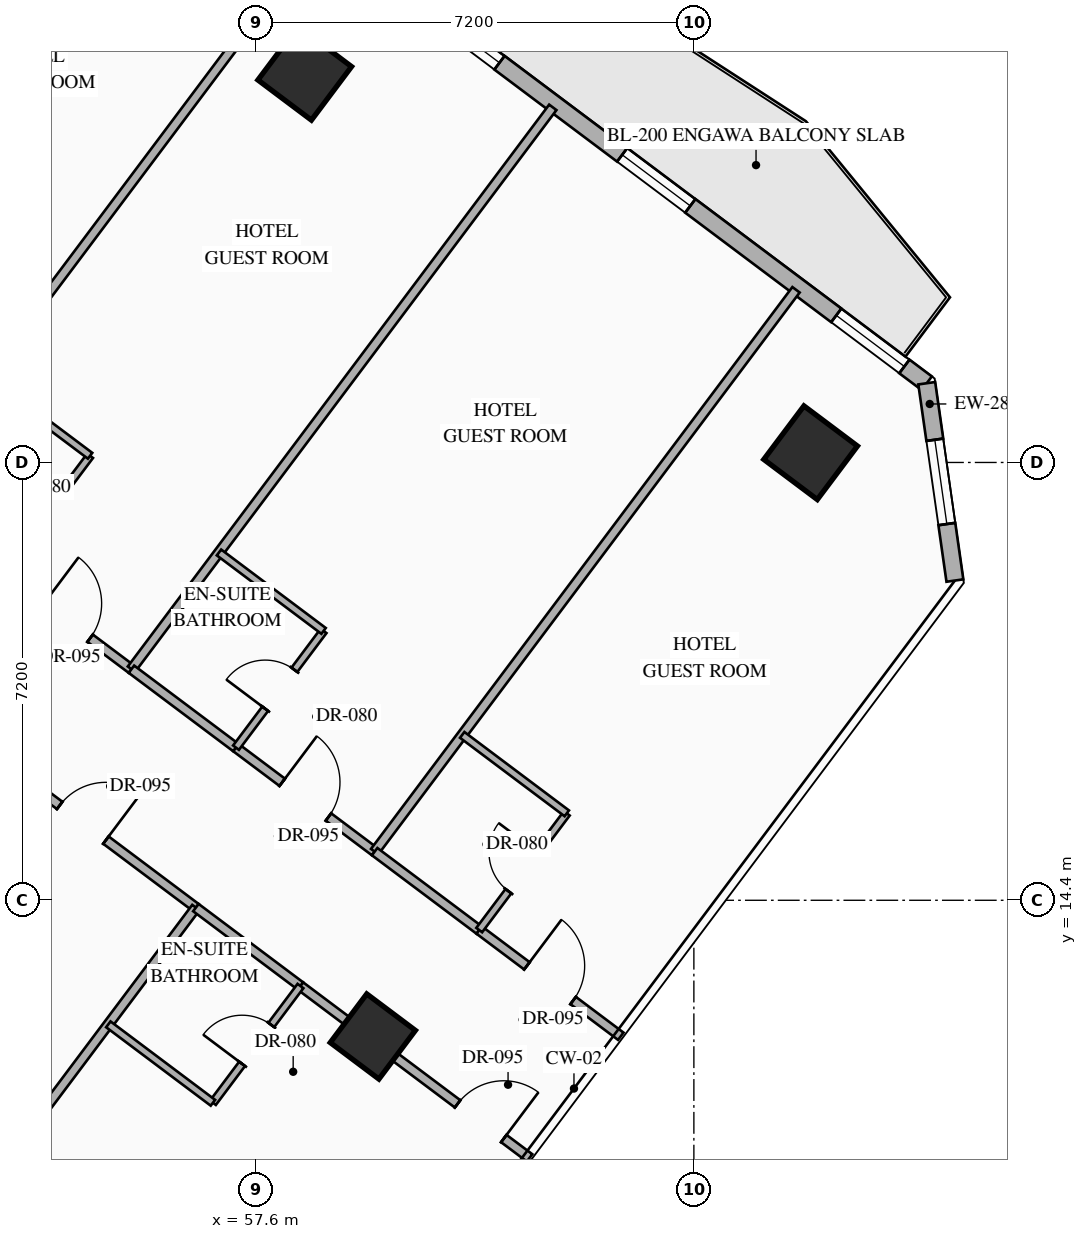
"""IFC4 building model, lengths in metres.
Left out: names, types, materials, properties, quantities, classifications, styles, units other than length and angle.
Written with IfcOpenShell. Run it as: python <this file> out.ifc"""

import sys

from ifc_helpers import new_model, si_unit, direction, frame, frame_2d, origin, origin_2d, place, context, subcontext, project, spatial, rectangle, hollow_rectangle, extrude, element, fill, save


model = new_model("IFC4")
c1 = context("Model", 3, precision=1e-05, world=origin(), true_north=direction((0.0, 1.0)))
c2 = subcontext(c1, "Body", "Model", "MODEL_VIEW")
j1 = project(units=[si_unit("LENGTHUNIT", "METRE"), si_unit("PLANEANGLEUNIT", "RADIAN")], contexts=[c1])
p1 = place(None, origin())
s1 = spatial("IfcSite", under=j1, at=p1, CompositionType="ELEMENT")
p2 = place(p1, origin())
s2 = spatial("IfcBuilding", under=s1, at=p2, CompositionType="ELEMENT")
p3 = place(p2, frame((0.0, 0.0, 36.6)))
s3 = spatial("IfcBuildingStorey", under=s2, at=p3, CompositionType="ELEMENT", Elevation=36.6)
for number, where, z_axis, x_axis in (
    (1, (58.4, 28.0, 0.0), (0.0, 0.0, 1.0), (0.8, -0.6, 0.0)),
    (2, (66.72, 21.76, 0.0), (0.0, 0.0, 1.0), (0.8, -0.6, 0.0)),
):
    element("IfcColumn", number, at=place(p3, frame(where, z_axis=z_axis, x_axis=x_axis)), inside=s3, PredefinedType="COLUMN", context=c2, shape_type="SweptSolid", body=[
        extrude(hollow_rectangle(XDim=1.1, YDim=1.1, WallThickness=0.04, at=origin_2d()), origin(), (0.0, 0.0, 1.0), 3.35),
    ])
p4 = place(p3, frame((59.52, 12.16, 0.0), z_axis=(0.0, 0.0, 1.0), x_axis=(0.799999996291, -0.600000004945, 0.0)))
e3 = element("IfcColumn", 3, at=p4, inside=s3, PredefinedType="COLUMN", context=c2, shape_type="SweptSolid", body=[
    extrude(hollow_rectangle(XDim=1.0, YDim=1.0, WallThickness=0.038, at=origin_2d()), origin(), (0.0, 0.0, 1.0), 3.35),
])
p5 = place(p3, frame((44.86, 40.73, 0.0), z_axis=(0.0, 0.0, 1.0), x_axis=(0.800006902154, -0.599990797017, 0.0)))
e4 = element("IfcWall", 4, at=p5, inside=s3, PredefinedType="STANDARD", context=c2, shape_type="SweptSolid", body=[
    extrude(rectangle(XDim=29.712, YDim=0.28, at=frame_2d((14.856, 0.0))), origin(), (0.0, 0.0, 1.0), 3.13),
])
p6 = place(p5, frame((14.249, 0.0, 0.0)))
e5 = element("IfcOpeningElement", 5, at=p6, cuts=e4, PredefinedType="OPENING", context=c2, shape_type="SweptSolid", body=[
    extrude(rectangle(XDim=1.1, YDim=2.2, at=frame_2d((0.55, 1.1))), frame((0.0, 0.15, 0.0), z_axis=(0.0, -1.0, 0.0), x_axis=(1.0, 0.0, 0.0)), (0.0, 0.0, 1.0), 0.3),
])
p7 = place(p5, frame((1.612, 0.0, 0.85)))
e6 = element("IfcOpeningElement", 6, at=p7, cuts=e4, PredefinedType="OPENING", context=c2, shape_type="SweptSolid", body=[
    extrude(rectangle(XDim=1.4, YDim=1.8, at=frame_2d((0.7, 0.9))), frame((0.0, 0.15, 0.0), z_axis=(0.0, -1.0, 0.0), x_axis=(1.0, 0.0, 0.0)), (0.0, 0.0, 1.0), 0.3),
])
p8 = place(p5, frame((5.667, 0.0, 0.85)))
e7 = element("IfcOpeningElement", 7, at=p8, cuts=e4, PredefinedType="OPENING", context=c2, shape_type="SweptSolid", body=[
    extrude(rectangle(XDim=1.4, YDim=1.8, at=frame_2d((0.7, 0.9))), frame((0.0, 0.15, 0.0), z_axis=(0.0, -1.0, 0.0), x_axis=(1.0, 0.0, 0.0)), (0.0, 0.0, 1.0), 0.3),
])
p9 = place(p5, frame((9.912, 0.0, 0.85)))
e8 = element("IfcOpeningElement", 8, at=p9, cuts=e4, PredefinedType="OPENING", context=c2, shape_type="SweptSolid", body=[
    extrude(rectangle(XDim=1.4, YDim=1.8, at=frame_2d((0.7, 0.9))), frame((0.0, 0.15, 0.0), z_axis=(0.0, -1.0, 0.0), x_axis=(1.0, 0.0, 0.0)), (0.0, 0.0, 1.0), 0.3),
])
p10 = place(p5, frame((19.528, 0.0, 0.85)))
e9 = element("IfcOpeningElement", 9, at=p10, cuts=e4, PredefinedType="OPENING", context=c2, shape_type="SweptSolid", body=[
    extrude(rectangle(XDim=1.4, YDim=1.8, at=frame_2d((0.7, 0.9))), frame((0.0, 0.15, 0.0), z_axis=(0.0, -1.0, 0.0), x_axis=(1.0, 0.0, 0.0)), (0.0, 0.0, 1.0), 0.3),
])
p11 = place(p5, frame((23.451, 0.0, 0.85)))
e10 = element("IfcOpeningElement", 10, at=p11, cuts=e4, PredefinedType="OPENING", context=c2, shape_type="SweptSolid", body=[
    extrude(rectangle(XDim=1.4, YDim=1.8, at=frame_2d((0.7, 0.9))), frame((0.0, 0.15, 0.0), z_axis=(0.0, -1.0, 0.0), x_axis=(1.0, 0.0, 0.0)), (0.0, 0.0, 1.0), 0.3),
])
p12 = place(p5, frame((27.852, 0.0, 0.85)))
e11 = element("IfcOpeningElement", 11, at=p12, cuts=e4, PredefinedType="OPENING", context=c2, shape_type="SweptSolid", body=[
    extrude(rectangle(XDim=1.4, YDim=1.8, at=frame_2d((0.7, 0.9))), frame((0.0, 0.15, 0.0), z_axis=(0.0, -1.0, 0.0), x_axis=(1.0, 0.0, 0.0)), (0.0, 0.0, 1.0), 0.3),
])
p13 = place(p3, frame((68.63, 22.903, 0.0), z_axis=(0.0, 0.0, 1.0), x_axis=(0.141285803956, -0.989968848803, 0.0)))
e12 = element("IfcWall", 12, at=p13, inside=s3, PredefinedType="STANDARD", context=c2, shape_type="SweptSolid", body=[
    extrude(rectangle(XDim=3.278, YDim=0.28, at=frame_2d((1.639, 0.0))), origin(), (0.0, 0.0, 1.0), 3.13),
])
p14 = place(p13, frame((0.939, 0.0, 0.85)))
e13 = element("IfcOpeningElement", 13, at=p14, cuts=e12, PredefinedType="OPENING", context=c2, shape_type="SweptSolid", body=[
    extrude(rectangle(XDim=1.4, YDim=1.8, at=frame_2d((0.7, 0.9))), frame((0.0, 0.15, 0.0), z_axis=(0.0, -1.0, 0.0), x_axis=(1.0, 0.0, 0.0)), (0.0, 0.0, 1.0), 0.3),
])
for number, where, z_axis, x_axis in (
    (14, (47.87, 23.96, 0.0), (0.0, 0.0, 1.0), (0.6, 0.8, 0.0)),
    (15, (51.71, 21.08, 0.0), (0.0, 0.0, 1.0), (0.6, 0.8, 0.0)),
):
    element("IfcWall", number, at=place(p3, frame(where, z_axis=z_axis, x_axis=x_axis)), inside=s3, PredefinedType="PARTITIONING", context=c2, shape_type="SweptSolid", body=[
        extrude(rectangle(XDim=11.55, YDim=0.15, at=frame_2d((5.775, 0.0))), origin(), (0.0, 0.0, 1.0), 3.13),
    ])
p15 = place(p3, frame((53.43, 19.79, 0.0), z_axis=(0.0, 0.0, 1.0), x_axis=(0.8, -0.6, 0.0)))
e16 = element("IfcWall", 16, at=p15, inside=s3, PredefinedType="PARTITIONING", context=c2, shape_type="SweptSolid", body=[
    extrude(rectangle(XDim=2.65, YDim=0.15, at=frame_2d((1.325, 0.0))), origin(), (0.0, 0.0, 1.0), 2.775),
])
p16 = place(p15, frame((0.85, 0.0, 0.0)))
e17 = element("IfcOpeningElement", 17, at=p16, cuts=e16, PredefinedType="OPENING", context=c2, shape_type="SweptSolid", body=[
    extrude(rectangle(XDim=0.95, YDim=2.15, at=frame_2d((0.475, 1.075))), frame((0.0, 0.085, 0.0), z_axis=(0.0, -1.0, 0.0), x_axis=(1.0, 0.0, 0.0)), (0.0, 0.0, 1.0), 0.17),
])
p17 = place(p3, frame((53.43, 19.79, 0.0), z_axis=(0.0, 0.0, 1.0), x_axis=(0.600065100855, 0.79995117022, 0.0)))
e18 = element("IfcWall", 18, at=p17, inside=s3, PredefinedType="PARTITIONING", context=c2, shape_type="SweptSolid", body=[
    extrude(rectangle(XDim=2.4, YDim=0.12, at=frame_2d((1.2, 0.0))), origin(), (0.0, 0.0, 1.0), 3.13),
])
p18 = place(p17, frame((0.8, 0.0, 0.0)))
e19 = element("IfcOpeningElement", 19, at=p18, cuts=e18, PredefinedType="OPENING", context=c2, shape_type="SweptSolid", body=[
    extrude(rectangle(XDim=0.8, YDim=2.06, at=frame_2d((0.4, 1.03))), frame((0.0, 0.07, 0.0), z_axis=(0.0, -1.0, 0.0), x_axis=(1.0, 0.0, 0.0)), (0.0, 0.0, 1.0), 0.14),
])
p19 = place(p3, frame((53.15, 23.0, 0.0), z_axis=(0.0, 0.0, 1.0), x_axis=(0.800027249606, -0.599963665473, 0.0)))
e20 = element("IfcWall", 20, at=p19, inside=s3, PredefinedType="PARTITIONING", context=c2, shape_type="SweptSolid", body=[
    extrude(rectangle(XDim=2.15, YDim=0.12, at=frame_2d((1.075, 0.0))), origin(), (0.0, 0.0, 1.0), 3.13),
])
p20 = place(p3, frame((55.55, 18.2, 0.0), z_axis=(0.0, 0.0, 1.0), x_axis=(0.599996617946, 0.80000253653, 0.0)))
e21 = element("IfcWall", 21, at=p20, inside=s3, PredefinedType="PARTITIONING", context=c2, shape_type="SweptSolid", body=[
    extrude(rectangle(XDim=11.55, YDim=0.15, at=frame_2d((5.775, 0.0))), origin(), (0.0, 0.0, 1.0), 3.13),
])
p21 = place(p3, frame((55.55, 18.2, 0.0), z_axis=(0.0, 0.0, 1.0), x_axis=(0.79998637334, -0.60001816845, 0.0)))
e22 = element("IfcWall", 22, at=p21, inside=s3, PredefinedType="PARTITIONING", context=c2, shape_type="SweptSolid", body=[
    extrude(rectangle(XDim=2.15, YDim=0.15, at=frame_2d((1.075, 0.0))), origin(), (0.0, 0.0, 1.0), 2.775),
])
p22 = place(p3, frame((57.27, 16.91, 0.0), z_axis=(0.0, 0.0, 1.0), x_axis=(0.800010279488, -0.599986293772, 0.0)))
e23 = element("IfcWall", 23, at=p22, inside=s3, PredefinedType="PARTITIONING", context=c2, shape_type="SweptSolid", body=[
    extrude(rectangle(XDim=2.85, YDim=0.15, at=frame_2d((1.425, 0.0))), origin(), (0.0, 0.0, 1.0), 2.775),
])
p23 = place(p22, frame((0.95, 0.0, 0.0)))
e24 = element("IfcOpeningElement", 24, at=p23, cuts=e23, PredefinedType="OPENING", context=c2, shape_type="SweptSolid", body=[
    extrude(rectangle(XDim=0.95, YDim=2.15, at=frame_2d((0.475, 1.075))), frame((0.0, 0.085, 0.0), z_axis=(0.0, -1.0, 0.0), x_axis=(1.0, 0.0, 0.0)), (0.0, 0.0, 1.0), 0.17),
])
p24 = place(p3, frame((57.27, 16.91, 0.0), z_axis=(0.0, 0.0, 1.0), x_axis=(0.599951172744, 0.800036618114, 0.0)))
e25 = element("IfcWall", 25, at=p24, inside=s3, PredefinedType="PARTITIONING", context=c2, shape_type="SweptSolid", body=[
    extrude(rectangle(XDim=2.4, YDim=0.12, at=frame_2d((1.2, 0.0))), origin(), (0.0, 0.0, 1.0), 3.13),
])
p25 = place(p24, frame((0.8, 0.0, 0.0)))
e26 = element("IfcOpeningElement", 26, at=p25, cuts=e25, PredefinedType="OPENING", context=c2, shape_type="SweptSolid", body=[
    extrude(rectangle(XDim=0.8, YDim=2.06, at=frame_2d((0.4, 1.03))), frame((0.0, 0.07, 0.0), z_axis=(0.0, -1.0, 0.0), x_axis=(1.0, 0.0, 0.0)), (0.0, 0.0, 1.0), 0.14),
])
p26 = place(p3, frame((56.99, 20.12, 0.0), z_axis=(0.0, 0.0, 1.0), x_axis=(0.79998637334, -0.60001816845, 0.0)))
e27 = element("IfcWall", 27, at=p26, inside=s3, PredefinedType="PARTITIONING", context=c2, shape_type="SweptSolid", body=[
    extrude(rectangle(XDim=2.15, YDim=0.12, at=frame_2d((1.075, 0.0))), origin(), (0.0, 0.0, 1.0), 3.13),
])
p27 = place(p3, frame((59.55, 15.2, 0.0), z_axis=(0.0, 0.0, 1.0), x_axis=(0.599996617946, 0.80000253653, 0.0)))
e28 = element("IfcWall", 28, at=p27, inside=s3, PredefinedType="PARTITIONING", context=c2, shape_type="SweptSolid", body=[
    extrude(rectangle(XDim=11.55, YDim=0.15, at=frame_2d((5.775, 0.0))), origin(), (0.0, 0.0, 1.0), 3.13),
])
p28 = place(p3, frame((59.55, 15.2, 0.0), z_axis=(0.0, 0.0, 1.0), x_axis=(0.79998637334, -0.60001816845, 0.0)))
e29 = element("IfcWall", 29, at=p28, inside=s3, PredefinedType="PARTITIONING", context=c2, shape_type="SweptSolid", body=[
    extrude(rectangle(XDim=2.15, YDim=0.15, at=frame_2d((1.075, 0.0))), origin(), (0.0, 0.0, 1.0), 2.775),
])
p29 = place(p3, frame((61.27, 13.91, 0.0), z_axis=(0.0, 0.0, 1.0), x_axis=(0.800010068184, -0.59998657552, 0.0)))
e30 = element("IfcWall", 30, at=p29, inside=s3, PredefinedType="PARTITIONING", context=c2, shape_type="SweptSolid", body=[
    extrude(rectangle(XDim=2.91, YDim=0.15, at=frame_2d((1.455, 0.0))), origin(), (0.0, 0.0, 1.0), 3.13),
])
p30 = place(p29, frame((0.98, 0.0, 0.0)))
e31 = element("IfcOpeningElement", 31, at=p30, cuts=e30, PredefinedType="OPENING", context=c2, shape_type="SweptSolid", body=[
    extrude(rectangle(XDim=0.95, YDim=2.15, at=frame_2d((0.475, 1.075))), frame((0.0, 0.085, 0.0), z_axis=(0.0, -1.0, 0.0), x_axis=(1.0, 0.0, 0.0)), (0.0, 0.0, 1.0), 0.17),
])
p31 = place(p3, frame((61.27, 13.91, 0.0), z_axis=(0.0, 0.0, 1.0), x_axis=(0.599951172744, 0.800036618114, 0.0)))
e32 = element("IfcWall", 32, at=p31, inside=s3, PredefinedType="PARTITIONING", context=c2, shape_type="SweptSolid", body=[
    extrude(rectangle(XDim=2.4, YDim=0.12, at=frame_2d((1.2, 0.0))), origin(), (0.0, 0.0, 1.0), 3.13),
])
p32 = place(p31, frame((0.8, 0.0, 0.0)))
e33 = element("IfcOpeningElement", 33, at=p32, cuts=e32, PredefinedType="OPENING", context=c2, shape_type="SweptSolid", body=[
    extrude(rectangle(XDim=0.8, YDim=2.06, at=frame_2d((0.4, 1.03))), frame((0.0, 0.07, 0.0), z_axis=(0.0, -1.0, 0.0), x_axis=(1.0, 0.0, 0.0)), (0.0, 0.0, 1.0), 0.14),
])
p33 = place(p3, frame((60.99, 17.12, 0.0), z_axis=(0.0, 0.0, 1.0), x_axis=(0.79998637334, -0.60001816845, 0.0)))
e34 = element("IfcWall", 34, at=p33, inside=s3, PredefinedType="PARTITIONING", context=c2, shape_type="SweptSolid", body=[
    extrude(rectangle(XDim=2.15, YDim=0.12, at=frame_2d((1.075, 0.0))), origin(), (0.0, 0.0, 1.0), 3.13),
])
p34 = place(p3, frame((52.89, 17.07, 0.0), z_axis=(0.0, 0.0, 1.0), x_axis=(0.800012600101, -0.599983199498, 0.0)))
e35 = element("IfcWall", 35, at=p34, inside=s3, PredefinedType="PARTITIONING", context=c2, shape_type="SweptSolid", body=[
    extrude(rectangle(XDim=4.65, YDim=0.15, at=frame_2d((2.325, 0.0))), origin(), (0.0, 0.0, 1.0), 2.425),
])
p35 = place(p34, frame((1.85, 0.0, 0.0)))
e36 = element("IfcOpeningElement", 36, at=p35, cuts=e35, PredefinedType="OPENING", context=c2, shape_type="SweptSolid", body=[
    extrude(rectangle(XDim=0.95, YDim=2.15, at=frame_2d((0.475, 1.075))), frame((0.0, 0.085, 0.0), z_axis=(0.0, -1.0, 0.0), x_axis=(1.0, 0.0, 0.0)), (0.0, 0.0, 1.0), 0.17),
])
p36 = place(p3, frame((49.8, 5.2, 0.0), z_axis=(0.0, 0.0, 1.0), x_axis=(0.6, 0.8, 0.0)))
e37 = element("IfcWall", 37, at=p36, inside=s3, PredefinedType="PARTITIONING", context=c2, shape_type="SweptSolid", body=[
    extrude(rectangle(XDim=11.35, YDim=0.15, at=frame_2d((5.675, 0.0))), origin(), (0.0, 0.0, 1.0), 3.13),
])
p37 = place(p3, frame((56.61, 14.28, 0.0), z_axis=(0.0, 0.0, 1.0), x_axis=(0.79998637334, -0.60001816845, 0.0)))
e38 = element("IfcWall", 38, at=p37, inside=s3, PredefinedType="PARTITIONING", context=c2, shape_type="SweptSolid", body=[
    extrude(rectangle(XDim=2.15, YDim=0.15, at=frame_2d((1.075, 0.0))), origin(), (0.0, 0.0, 1.0), 2.425),
])
p38 = place(p3, frame((58.33, 12.99, 0.0), z_axis=(0.0, 0.0, 1.0), x_axis=(0.799993779569, -0.600008293819, 0.0)))
e39 = element("IfcWall", 39, at=p38, inside=s3, PredefinedType="PARTITIONING", context=c2, shape_type="SweptSolid", body=[
    extrude(rectangle(XDim=4.71, YDim=0.15, at=frame_2d((2.355, 0.0))), origin(), (0.0, 0.0, 1.0), 2.425),
])
p39 = place(p38, frame((3.23, 0.0, 0.0)))
e40 = element("IfcOpeningElement", 40, at=p39, cuts=e39, PredefinedType="OPENING", context=c2, shape_type="SweptSolid", body=[
    extrude(rectangle(XDim=0.95, YDim=2.15, at=frame_2d((0.475, 1.075))), frame((0.0, 0.085, 0.0), z_axis=(0.0, -1.0, 0.0), x_axis=(1.0, 0.0, 0.0)), (0.0, 0.0, 1.0), 0.17),
])
p40 = place(p3, frame((56.89, 11.07, 0.0), z_axis=(0.0, 0.0, 1.0), x_axis=(0.600065100855, 0.79995117022, 0.0)))
e41 = element("IfcWall", 41, at=p40, inside=s3, PredefinedType="PARTITIONING", context=c2, shape_type="SweptSolid", body=[
    extrude(rectangle(XDim=2.4, YDim=0.12, at=frame_2d((1.2, 0.0))), origin(), (0.0, 0.0, 1.0), 3.13),
])
p41 = place(p40, frame((0.8, 0.0, 0.0)))
e42 = element("IfcOpeningElement", 42, at=p41, cuts=e41, PredefinedType="OPENING", context=c2, shape_type="SweptSolid", body=[
    extrude(rectangle(XDim=0.8, YDim=2.06, at=frame_2d((0.4, 1.03))), frame((0.0, 0.07, 0.0), z_axis=(0.0, -1.0, 0.0), x_axis=(1.0, 0.0, 0.0)), (0.0, 0.0, 1.0), 0.14),
])
p42 = place(p3, frame((55.17, 12.36, 0.0), z_axis=(0.0, 0.0, 1.0), x_axis=(0.79998637334, -0.60001816845, 0.0)))
e43 = element("IfcWall", 43, at=p42, inside=s3, PredefinedType="PARTITIONING", context=c2, shape_type="SweptSolid", body=[
    extrude(rectangle(XDim=2.15, YDim=0.12, at=frame_2d((1.075, 0.0))), origin(), (0.0, 0.0, 1.0), 3.13),
])
p43 = place(p10, origin())
e44 = element("IfcWindow", 44, at=p43, inside=s3, PartitioningType="SINGLE_PANEL", PredefinedType="WINDOW", context=c2, shape_type="SweptSolid", body=[
    extrude(rectangle(XDim=1.4, YDim=1.8, at=frame_2d((0.7, 0.9))), frame((0.0, 0.03, 0.0), z_axis=(0.0, -1.0, 0.0), x_axis=(1.0, 0.0, 0.0)), (0.0, 0.0, 1.0), 0.06),
])
fill(e9, e44)
p44 = place(p11, origin())
e45 = element("IfcWindow", 45, at=p44, inside=s3, PartitioningType="SINGLE_PANEL", PredefinedType="WINDOW", context=c2, shape_type="SweptSolid", body=[
    extrude(rectangle(XDim=1.4, YDim=1.8, at=frame_2d((0.7, 0.9))), frame((0.0, 0.03, 0.0), z_axis=(0.0, -1.0, 0.0), x_axis=(1.0, 0.0, 0.0)), (0.0, 0.0, 1.0), 0.06),
])
fill(e10, e45)
p45 = place(p12, origin())
e46 = element("IfcWindow", 46, at=p45, inside=s3, PartitioningType="SINGLE_PANEL", PredefinedType="WINDOW", context=c2, shape_type="SweptSolid", body=[
    extrude(rectangle(XDim=1.4, YDim=1.8, at=frame_2d((0.7, 0.9))), frame((0.0, 0.03, 0.0), z_axis=(0.0, -1.0, 0.0), x_axis=(1.0, 0.0, 0.0)), (0.0, 0.0, 1.0), 0.06),
])
fill(e11, e46)
p46 = place(p14, origin())
e47 = element("IfcWindow", 47, at=p46, inside=s3, PartitioningType="SINGLE_PANEL", PredefinedType="WINDOW", context=c2, shape_type="SweptSolid", body=[
    extrude(rectangle(XDim=1.4, YDim=1.8, at=frame_2d((0.7, 0.9))), frame((0.0, 0.03, 0.0), z_axis=(0.0, -1.0, 0.0), x_axis=(1.0, 0.0, 0.0)), (0.0, 0.0, 1.0), 0.06),
])
fill(e13, e47)
p47 = place(p16, origin())
e48 = element("IfcDoor", 48, at=p47, inside=s3, OperationType="SINGLE_SWING_LEFT", PredefinedType="DOOR", context=c2, shape_type="SweptSolid", body=[
    extrude(rectangle(XDim=0.95, YDim=2.15, at=frame_2d((0.475, 1.075))), frame((0.0, 0.025, 0.0), z_axis=(0.0, -1.0, 0.0), x_axis=(1.0, 0.0, 0.0)), (0.0, 0.0, 1.0), 0.05),
])
fill(e17, e48)
p48 = place(p18, origin())
e49 = element("IfcDoor", 49, at=p48, inside=s3, OperationType="SINGLE_SWING_RIGHT", PredefinedType="DOOR", context=c2, shape_type="SweptSolid", body=[
    extrude(rectangle(XDim=0.8, YDim=2.06, at=frame_2d((0.4, 1.03))), frame((0.0, 0.025, 0.0), z_axis=(0.0, -1.0, 0.0), x_axis=(1.0, 0.0, 0.0)), (0.0, 0.0, 1.0), 0.05),
])
fill(e19, e49)
p49 = place(p23, origin())
e50 = element("IfcDoor", 50, at=p49, inside=s3, OperationType="SINGLE_SWING_LEFT", PredefinedType="DOOR", context=c2, shape_type="SweptSolid", body=[
    extrude(rectangle(XDim=0.95, YDim=2.15, at=frame_2d((0.475, 1.075))), frame((0.0, 0.025, 0.0), z_axis=(0.0, -1.0, 0.0), x_axis=(1.0, 0.0, 0.0)), (0.0, 0.0, 1.0), 0.05),
])
fill(e24, e50)
p50 = place(p25, origin())
e51 = element("IfcDoor", 51, at=p50, inside=s3, OperationType="SINGLE_SWING_LEFT", PredefinedType="DOOR", context=c2, shape_type="SweptSolid", body=[
    extrude(rectangle(XDim=0.8, YDim=2.06, at=frame_2d((0.4, 1.03))), frame((0.0, 0.025, 0.0), z_axis=(0.0, -1.0, 0.0), x_axis=(1.0, 0.0, 0.0)), (0.0, 0.0, 1.0), 0.05),
])
fill(e26, e51)
p51 = place(p30, origin())
e52 = element("IfcDoor", 52, at=p51, inside=s3, OperationType="SINGLE_SWING_LEFT", PredefinedType="DOOR", context=c2, shape_type="SweptSolid", body=[
    extrude(rectangle(XDim=0.95, YDim=2.15, at=frame_2d((0.475, 1.075))), frame((0.0, 0.025, 0.0), z_axis=(0.0, -1.0, 0.0), x_axis=(1.0, 0.0, 0.0)), (0.0, 0.0, 1.0), 0.05),
])
fill(e31, e52)
p52 = place(p32, origin())
e53 = element("IfcDoor", 53, at=p52, inside=s3, OperationType="SINGLE_SWING_RIGHT", PredefinedType="DOOR", context=c2, shape_type="SweptSolid", body=[
    extrude(rectangle(XDim=0.8, YDim=2.06, at=frame_2d((0.4, 1.03))), frame((0.0, 0.025, 0.0), z_axis=(0.0, -1.0, 0.0), x_axis=(1.0, 0.0, 0.0)), (0.0, 0.0, 1.0), 0.05),
])
fill(e33, e53)
p53 = place(p35, origin())
e54 = element("IfcDoor", 54, at=p53, inside=s3, OperationType="SINGLE_SWING_RIGHT", PredefinedType="DOOR", context=c2, shape_type="SweptSolid", body=[
    extrude(rectangle(XDim=0.95, YDim=2.15, at=frame_2d((0.475, 1.075))), frame((0.0, 0.025, 0.0), z_axis=(0.0, -1.0, 0.0), x_axis=(1.0, 0.0, 0.0)), (0.0, 0.0, 1.0), 0.05),
])
fill(e36, e54)
p54 = place(p39, origin())
e55 = element("IfcDoor", 55, at=p54, inside=s3, OperationType="SINGLE_SWING_RIGHT", PredefinedType="DOOR", context=c2, shape_type="SweptSolid", body=[
    extrude(rectangle(XDim=0.95, YDim=2.15, at=frame_2d((0.475, 1.075))), frame((0.0, 0.025, 0.0), z_axis=(0.0, -1.0, 0.0), x_axis=(1.0, 0.0, 0.0)), (0.0, 0.0, 1.0), 0.05),
])
fill(e40, e55)
p55 = place(p41, origin())
e56 = element("IfcDoor", 56, at=p55, inside=s3, OperationType="SINGLE_SWING_LEFT", PredefinedType="DOOR", context=c2, shape_type="SweptSolid", body=[
    extrude(rectangle(XDim=0.8, YDim=2.06, at=frame_2d((0.4, 1.03))), frame((0.0, 0.025, 0.0), z_axis=(0.0, -1.0, 0.0), x_axis=(1.0, 0.0, 0.0)), (0.0, 0.0, 1.0), 0.05),
])
fill(e42, e56)
save(model, sys.argv[1])
